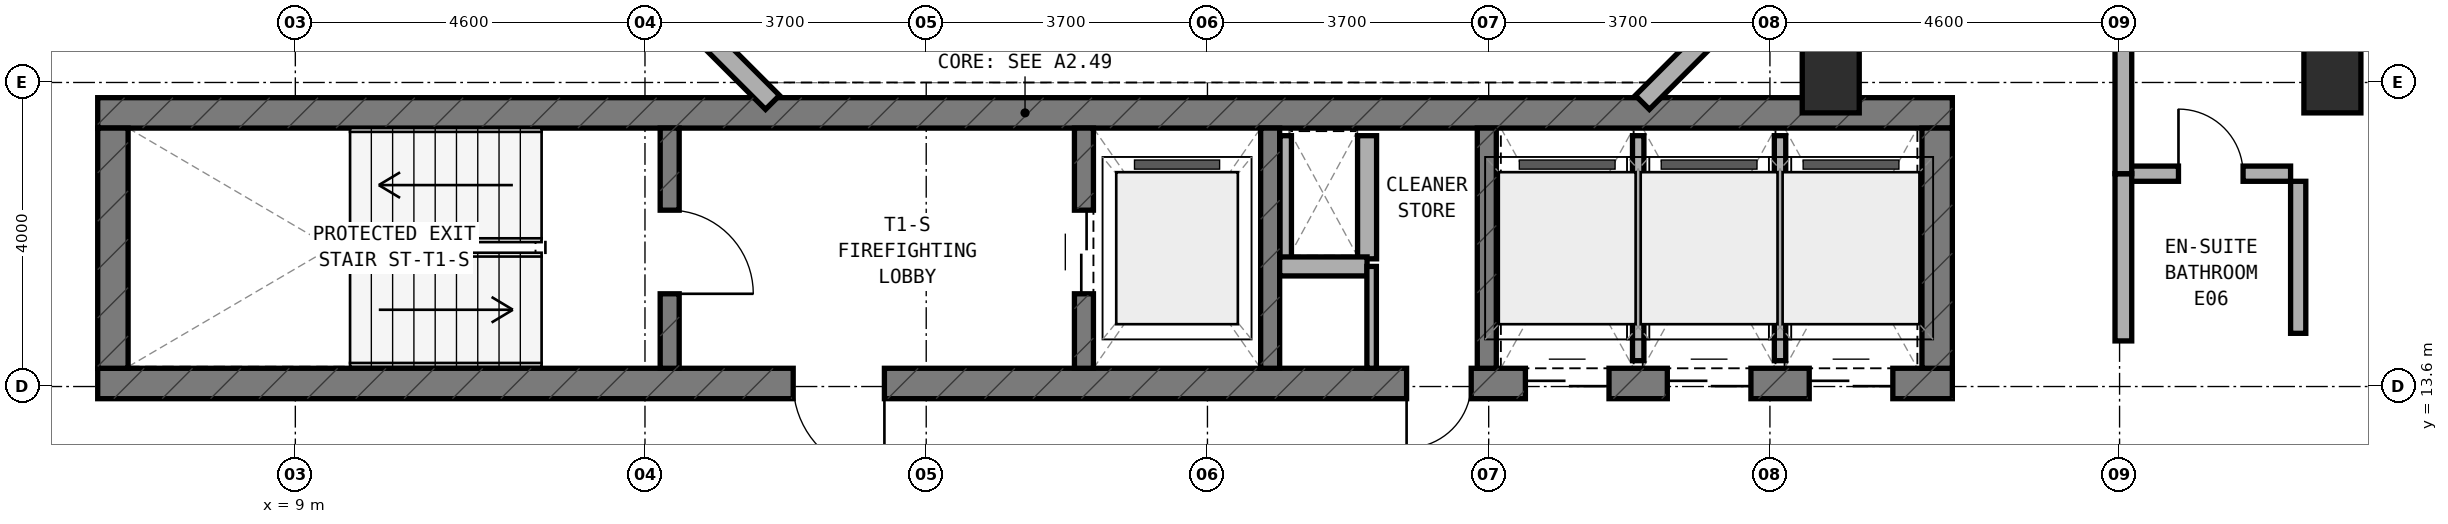
"""IFC4 building model, lengths in metres.
Left out: names, types, materials, properties, quantities, classifications, styles, units other than length and angle.
Written with IfcOpenShell. Run it as: python <this file> out.ifc"""

import sys

from ifc_helpers import new_model, si_unit, direction, frame, frame_2d, origin, origin_2d, place, context, subcontext, project, spatial, rectangle, extrude, element, fill, save


model = new_model("IFC4")
c1 = context("Model", 3, precision=1e-05, world=origin(), true_north=direction((0.0, 1.0)))
c2 = subcontext(c1, "Body", "Model", "MODEL_VIEW")
j1 = project(units=[si_unit("LENGTHUNIT", "METRE"), si_unit("PLANEANGLEUNIT", "RADIAN")], contexts=[c1])
p1 = place(None, origin())
s1 = spatial("IfcSite", under=j1, at=p1, CompositionType="ELEMENT")
p2 = place(p1, origin())
s2 = spatial("IfcBuilding", under=s1, at=p2, CompositionType="ELEMENT")
p3 = place(p2, frame((0.0, 0.0, 231.5)))
s3 = spatial("IfcBuildingStorey", under=s2, at=p3, CompositionType="ELEMENT", Elevation=231.5)
p4 = place(p3, frame((6.4, 13.64, 0.0), z_axis=(0.0, 0.0, 1.0), x_axis=(1.0, 0.0, 0.0)))
e1 = element("IfcWall", 1, at=p4, inside=s3, PredefinedType="SHEAR", context=c2, shape_type="SweptSolid", body=[
    extrude(rectangle(XDim=24.4, YDim=0.4, at=frame_2d((12.2, 0.0))), origin(), (0.0, 0.0, 1.0), 3.6),
])
p5 = place(p4, frame((9.15, 0.0, 0.0)))
e2 = element("IfcOpeningElement", 2, at=p5, cuts=e1, PredefinedType="OPENING", context=c2, shape_type="SweptSolid", body=[
    extrude(rectangle(XDim=1.2, YDim=2.15, at=frame_2d((0.6, 1.075))), frame((0.0, 0.21, 0.0), z_axis=(0.0, -1.0, 0.0), x_axis=(1.0, 0.0, 0.0)), (0.0, 0.0, 1.0), 0.42),
])
p6 = place(p4, frame((17.22, 0.0, 0.0)))
e3 = element("IfcOpeningElement", 3, at=p6, cuts=e1, PredefinedType="OPENING", context=c2, shape_type="SweptSolid", body=[
    extrude(rectangle(XDim=0.85, YDim=2.1, at=frame_2d((0.425, 1.05))), frame((0.0, 0.21, 0.0), z_axis=(0.0, -1.0, 0.0), x_axis=(1.0, 0.0, 0.0)), (0.0, 0.0, 1.0), 0.42),
])
p7 = place(p4, frame((18.783, 0.0, 0.0)))
e4 = element("IfcOpeningElement", 4, at=p7, cuts=e1, PredefinedType="OPENING", context=c2, shape_type="SweptSolid", body=[
    extrude(rectangle(XDim=1.1, YDim=2.15, at=frame_2d((0.55, 1.075))), frame((0.0, 0.21, 0.0), z_axis=(0.0, -1.0, 0.0), x_axis=(1.0, 0.0, 0.0)), (0.0, 0.0, 1.0), 0.42),
])
p8 = place(p4, frame((20.65, 0.0, 0.0)))
e5 = element("IfcOpeningElement", 5, at=p8, cuts=e1, PredefinedType="OPENING", context=c2, shape_type="SweptSolid", body=[
    extrude(rectangle(XDim=1.1, YDim=2.15, at=frame_2d((0.55, 1.075))), frame((0.0, 0.21, 0.0), z_axis=(0.0, -1.0, 0.0), x_axis=(1.0, 0.0, 0.0)), (0.0, 0.0, 1.0), 0.42),
])
p9 = place(p4, frame((22.517, 0.0, 0.0)))
e6 = element("IfcOpeningElement", 6, at=p9, cuts=e1, PredefinedType="OPENING", context=c2, shape_type="SweptSolid", body=[
    extrude(rectangle(XDim=1.1, YDim=2.15, at=frame_2d((0.55, 1.075))), frame((0.0, 0.21, 0.0), z_axis=(0.0, -1.0, 0.0), x_axis=(1.0, 0.0, 0.0)), (0.0, 0.0, 1.0), 0.42),
])
p10 = place(p3, frame((6.4, 17.2, 0.0), z_axis=(0.0, 0.0, 1.0), x_axis=(1.0, 0.0, 0.0)))
e7 = element("IfcWall", 7, at=p10, inside=s3, PredefinedType="SHEAR", context=c2, shape_type="SweptSolid", body=[
    extrude(rectangle(XDim=24.4, YDim=0.4, at=frame_2d((12.2, 0.0))), origin(), (0.0, 0.0, 1.0), 3.6),
])
for number, where, z_axis, x_axis in (
    (8, (6.6, 13.84, 0.0), (0.0, 0.0, 1.0), (0.0, 1.0, 0.0)),
    (9, (30.6, 13.84, 0.0), (0.0, 0.0, 1.0), (0.0, 1.0, 0.0)),
):
    element("IfcWall", number, at=place(p3, frame(where, z_axis=z_axis, x_axis=x_axis)), inside=s3, PredefinedType="SHEAR", context=c2, shape_type="SweptSolid", body=[
        extrude(rectangle(XDim=3.16, YDim=0.4, at=frame_2d((1.58, 0.0))), origin(), (0.0, 0.0, 1.0), 3.6),
    ])
p11 = place(p3, frame((13.925, 13.84, 0.0), z_axis=(0.0, 0.0, 1.0), x_axis=(0.0, 1.0, 0.0)))
e10 = element("IfcWall", 10, at=p11, inside=s3, PredefinedType="STANDARD", context=c2, shape_type="SweptSolid", body=[
    extrude(rectangle(XDim=3.16, YDim=0.25, at=frame_2d((1.58, 0.0))), origin(), (0.0, 0.0, 1.0), 3.32),
])
p12 = place(p11, frame((0.98, 0.0, 0.0)))
e11 = element("IfcOpeningElement", 11, at=p12, cuts=e10, PredefinedType="OPENING", context=c2, shape_type="SweptSolid", body=[
    extrude(rectangle(XDim=1.1, YDim=2.15, at=frame_2d((0.55, 1.075))), frame((0.0, 0.135, 0.0), z_axis=(0.0, -1.0, 0.0), x_axis=(1.0, 0.0, 0.0)), (0.0, 0.0, 1.0), 0.27),
])
p13 = place(p3, frame((19.375, 13.84, 0.0), z_axis=(0.0, 0.0, 1.0), x_axis=(0.0, 1.0, 0.0)))
e12 = element("IfcWall", 12, at=p13, inside=s3, PredefinedType="STANDARD", context=c2, shape_type="SweptSolid", body=[
    extrude(rectangle(XDim=3.16, YDim=0.25, at=frame_2d((1.58, 0.0))), origin(), (0.0, 0.0, 1.0), 3.32),
])
p14 = place(p13, frame((0.98, 0.0, 0.0)))
e13 = element("IfcOpeningElement", 13, at=p14, cuts=e12, PredefinedType="OPENING", context=c2, shape_type="SweptSolid", body=[
    extrude(rectangle(XDim=1.1, YDim=2.15, at=frame_2d((0.55, 1.075))), frame((0.0, 0.135, 0.0), z_axis=(0.0, -1.0, 0.0), x_axis=(1.0, 0.0, 0.0)), (0.0, 0.0, 1.0), 0.27),
])
for number, where, z_axis, x_axis in (
    (14, (21.825, 13.84, 0.0), (0.0, 0.0, 1.0), (0.0, 1.0, 0.0)),
    (15, (24.675, 13.84, 0.0), (0.0, 0.0, 1.0), (0.0, 1.0, 0.0)),
):
    element("IfcWall", number, at=place(p3, frame(where, z_axis=z_axis, x_axis=x_axis)), inside=s3, PredefinedType="STANDARD", context=c2, shape_type="SweptSolid", body=[
        extrude(rectangle(XDim=3.16, YDim=0.25, at=frame_2d((1.58, 0.0))), origin(), (0.0, 0.0, 1.0), 3.32),
    ])
for number, where, z_axis, x_axis in (
    (16, (35.8, 17.65, 0.0), (0.0, 0.0, 1.0), (1.0, 0.0, 0.0)),
    (17, (29.2, 17.65, 0.0), (0.0, 0.0, 1.0), (1.0, 0.0, 0.0)),
):
    element("IfcColumn", number, at=place(p3, frame(where, z_axis=z_axis, x_axis=x_axis)), inside=s3, PredefinedType="COLUMN", context=c2, shape_type="SweptSolid", body=[
        extrude(rectangle(XDim=0.75, YDim=0.9, at=origin_2d()), origin(), (0.0, 0.0, 1.0), 3.6),
    ])
for number, where, z_axis, x_axis in (
    (18, (26.722, 17.338, 0.0), (0.0, 0.0, 1.0), (0.707, 0.707, 0.0)),
    (19, (13.444, 19.172, 0.0), (0.0, 0.0, 1.0), (0.707, -0.707, 0.0)),
):
    element("IfcWall", number, at=place(p3, frame(where, z_axis=z_axis, x_axis=x_axis)), inside=s3, PredefinedType="STANDARD", context=c2, shape_type="SweptSolid", body=[
        extrude(rectangle(XDim=2.594, YDim=0.26, at=frame_2d((1.297, 0.0))), origin(), (0.0, 0.0, 1.0), 3.32),
    ])
p15 = place(p3, frame((22.03, 15.28, 0.0), z_axis=(0.0, 0.0, 1.0), x_axis=(0.0, 1.0, 0.0)))
e20 = element("IfcWall", 20, at=p15, inside=s3, PredefinedType="PARTITIONING", context=c2, shape_type="SweptSolid", body=[
    extrude(rectangle(XDim=1.62, YDim=0.15, at=frame_2d((0.81, 0.0))), origin(), (0.0, 0.0, 1.0), 3.32),
])
p16 = place(p3, frame((23.1, 15.28, 0.0), z_axis=(0.0, 0.0, 1.0), x_axis=(0.0, 1.0, 0.0)))
e21 = element("IfcWall", 21, at=p16, inside=s3, PredefinedType="SOLIDWALL", context=c2, shape_type="SweptSolid", body=[
    extrude(rectangle(XDim=1.62, YDim=0.25, at=frame_2d((0.81, 0.0))), origin(), (0.0, 0.0, 1.0), 3.32),
])
p17 = place(p3, frame((21.95, 15.18, 0.0), z_axis=(0.0, 0.0, 1.0), x_axis=(1.0, 0.0, 0.0)))
e22 = element("IfcWall", 22, at=p17, inside=s3, PredefinedType="SOLIDWALL", context=c2, shape_type="SweptSolid", body=[
    extrude(rectangle(XDim=1.15, YDim=0.25, at=frame_2d((0.575, 0.0))), origin(), (0.0, 0.0, 1.0), 3.32),
])
p18 = place(p3, frame((23.16, 13.84, 0.0), z_axis=(0.0, 0.0, 1.0), x_axis=(0.0, 1.0, 0.0)))
e23 = element("IfcWall", 23, at=p18, inside=s3, PredefinedType="PARTITIONING", context=c2, shape_type="SweptSolid", body=[
    extrude(rectangle(XDim=1.34, YDim=0.125, at=frame_2d((0.67, 0.0))), origin(), (0.0, 0.0, 1.0), 3.32),
])
p19 = place(p3, frame((26.667, 13.94, 0.0), z_axis=(0.0, 0.0, 1.0), x_axis=(0.0, 1.0, 0.0)))
e24 = element("IfcWall", 24, at=p19, inside=s3, PredefinedType="PARTITIONING", context=c2, shape_type="SweptSolid", body=[
    extrude(rectangle(XDim=2.96, YDim=0.15, at=frame_2d((1.48, 0.0))), origin(), (0.0, 0.0, 1.0), 3.32),
])
p20 = place(p3, frame((28.533, 13.94, 0.0), z_axis=(0.0, 0.0, 1.0), x_axis=(0.0, 1.0, 0.0)))
e25 = element("IfcWall", 25, at=p20, inside=s3, PredefinedType="PARTITIONING", context=c2, shape_type="SweptSolid", body=[
    extrude(rectangle(XDim=2.96, YDim=0.15, at=frame_2d((1.48, 0.0))), origin(), (0.0, 0.0, 1.0), 2.745),
])
p21 = place(p3, frame((33.15, 16.4, 0.0), z_axis=(0.0, 0.0, 1.0), x_axis=(1.0, 0.0, 0.0)))
e26 = element("IfcWall", 26, at=p21, inside=s3, PredefinedType="PLUMBINGWALL", context=c2, shape_type="SweptSolid", body=[
    extrude(rectangle(XDim=2.1, YDim=0.2, at=frame_2d((1.05, 0.0))), origin(), (0.0, 0.0, 1.0), 3.32),
])
p22 = place(p21, frame((0.625, 0.0, 0.0)))
e27 = element("IfcOpeningElement", 27, at=p22, cuts=e26, PredefinedType="OPENING", context=c2, shape_type="SweptSolid", body=[
    extrude(rectangle(XDim=0.85, YDim=2.1, at=frame_2d((0.425, 1.05))), frame((0.0, 0.11, 0.0), z_axis=(0.0, -1.0, 0.0), x_axis=(1.0, 0.0, 0.0)), (0.0, 0.0, 1.0), 0.22),
])
p23 = place(p3, frame((35.35, 14.3, 0.0), z_axis=(0.0, 0.0, 1.0), x_axis=(0.0, 1.0, 0.0)))
e28 = element("IfcWall", 28, at=p23, inside=s3, PredefinedType="PLUMBINGWALL", context=c2, shape_type="SweptSolid", body=[
    extrude(rectangle(XDim=2.0, YDim=0.2, at=frame_2d((1.0, 0.0))), origin(), (0.0, 0.0, 1.0), 3.015),
])
p24 = place(p3, frame((33.05, 14.2, 0.0), z_axis=(0.0, 0.0, 1.0), x_axis=(0.0, 1.0, 0.0)))
e29 = element("IfcWall", 29, at=p24, inside=s3, PredefinedType="SOLIDWALL", context=c2, shape_type="SweptSolid", body=[
    extrude(rectangle(XDim=2.2, YDim=0.22, at=frame_2d((1.1, 0.0))), origin(), (0.0, 0.0, 1.0), 3.32),
])
p25 = place(p3, frame((33.05, 16.4, 0.0), z_axis=(0.0, 0.0, 1.0), x_axis=(0.0, 1.0, 0.0)))
e30 = element("IfcWall", 30, at=p25, inside=s3, PredefinedType="SOLIDWALL", context=c2, shape_type="SweptSolid", body=[
    extrude(rectangle(XDim=4.649, YDim=0.22, at=frame_2d((2.325, 0.0))), origin(), (0.0, 0.0, 1.0), 2.745),
])
p26 = place(p25, frame((1.85, 0.0, 0.0)))
e31 = element("IfcOpeningElement", 31, at=p26, cuts=e30, PredefinedType="OPENING", context=c2, shape_type="SweptSolid", body=[
    extrude(rectangle(XDim=0.95, YDim=2.1, at=frame_2d((0.475, 1.05))), frame((0.0, 0.12, 0.0), z_axis=(0.0, -1.0, 0.0), x_axis=(1.0, 0.0, 0.0)), (0.0, 0.0, 1.0), 0.24),
])
p27 = place(p12, frame((1.1, 0.0, 0.0), z_axis=(0.0, 0.0, 1.0), x_axis=(-1.0, 0.0, 0.0)))
e32 = element("IfcDoor", 32, at=p27, inside=s3, OperationType="SINGLE_SWING_RIGHT", PredefinedType="DOOR", context=c2, shape_type="SweptSolid", body=[
    extrude(rectangle(XDim=1.1, YDim=2.15, at=frame_2d((0.55, 1.075))), frame((0.0, 0.025, 0.0), z_axis=(0.0, -1.0, 0.0), x_axis=(1.0, 0.0, 0.0)), (0.0, 0.0, 1.0), 0.05),
])
fill(e11, e32)
p28 = place(p5, frame((1.2, 0.0, 0.0), z_axis=(0.0, 0.0, 1.0), x_axis=(-1.0, 0.0, 0.0)))
e33 = element("IfcDoor", 33, at=p28, inside=s3, OperationType="SINGLE_SWING_LEFT", PredefinedType="DOOR", context=c2, shape_type="SweptSolid", body=[
    extrude(rectangle(XDim=1.2, YDim=2.15, at=frame_2d((0.6, 1.075))), frame((0.0, 0.025, 0.0), z_axis=(0.0, -1.0, 0.0), x_axis=(1.0, 0.0, 0.0)), (0.0, 0.0, 1.0), 0.05),
])
fill(e2, e33)
p29 = place(p14, origin())
e34 = element("IfcDoor", 34, at=p29, inside=s3, OperationType="DOUBLE_DOOR_SLIDING", PredefinedType="DOOR", context=c2, shape_type="SweptSolid", body=[
    extrude(rectangle(XDim=1.1, YDim=2.15, at=frame_2d((0.55, 1.075))), frame((0.0, 0.025, 0.0), z_axis=(0.0, -1.0, 0.0), x_axis=(1.0, 0.0, 0.0)), (0.0, 0.0, 1.0), 0.05),
])
fill(e13, e34)
p30 = place(p6, frame((0.85, 0.0, 0.0), z_axis=(0.0, 0.0, 1.0), x_axis=(-1.0, 0.0, 0.0)))
e35 = element("IfcDoor", 35, at=p30, inside=s3, OperationType="SINGLE_SWING_RIGHT", PredefinedType="DOOR", context=c2, shape_type="SweptSolid", body=[
    extrude(rectangle(XDim=0.85, YDim=2.1, at=frame_2d((0.425, 1.05))), frame((0.0, 0.025, 0.0), z_axis=(0.0, -1.0, 0.0), x_axis=(1.0, 0.0, 0.0)), (0.0, 0.0, 1.0), 0.05),
])
fill(e3, e35)
p31 = place(p7, frame((1.1, 0.0, 0.0), z_axis=(0.0, 0.0, 1.0), x_axis=(-1.0, 0.0, 0.0)))
e36 = element("IfcDoor", 36, at=p31, inside=s3, OperationType="DOUBLE_DOOR_SLIDING", PredefinedType="DOOR", context=c2, shape_type="SweptSolid", body=[
    extrude(rectangle(XDim=1.1, YDim=2.15, at=frame_2d((0.55, 1.075))), frame((0.0, 0.025, 0.0), z_axis=(0.0, -1.0, 0.0), x_axis=(1.0, 0.0, 0.0)), (0.0, 0.0, 1.0), 0.05),
])
fill(e4, e36)
p32 = place(p8, frame((1.1, 0.0, 0.0), z_axis=(0.0, 0.0, 1.0), x_axis=(-1.0, 0.0, 0.0)))
e37 = element("IfcDoor", 37, at=p32, inside=s3, OperationType="DOUBLE_DOOR_SLIDING", PredefinedType="DOOR", context=c2, shape_type="SweptSolid", body=[
    extrude(rectangle(XDim=1.1, YDim=2.15, at=frame_2d((0.55, 1.075))), frame((0.0, 0.025, 0.0), z_axis=(0.0, -1.0, 0.0), x_axis=(1.0, 0.0, 0.0)), (0.0, 0.0, 1.0), 0.05),
])
fill(e5, e37)
p33 = place(p9, frame((1.1, 0.0, 0.0), z_axis=(0.0, 0.0, 1.0), x_axis=(-1.0, 0.0, 0.0)))
e38 = element("IfcDoor", 38, at=p33, inside=s3, OperationType="DOUBLE_DOOR_SLIDING", PredefinedType="DOOR", context=c2, shape_type="SweptSolid", body=[
    extrude(rectangle(XDim=1.1, YDim=2.15, at=frame_2d((0.55, 1.075))), frame((0.0, 0.025, 0.0), z_axis=(0.0, -1.0, 0.0), x_axis=(1.0, 0.0, 0.0)), (0.0, 0.0, 1.0), 0.05),
])
fill(e6, e38)
p34 = place(p22, origin())
e39 = element("IfcDoor", 39, at=p34, inside=s3, OperationType="SINGLE_SWING_LEFT", PredefinedType="DOOR", context=c2, shape_type="SweptSolid", body=[
    extrude(rectangle(XDim=0.85, YDim=2.1, at=frame_2d((0.425, 1.05))), frame((0.0, 0.025, 0.0), z_axis=(0.0, -1.0, 0.0), x_axis=(1.0, 0.0, 0.0)), (0.0, 0.0, 1.0), 0.05),
])
fill(e27, e39)
save(model, sys.argv[1])
